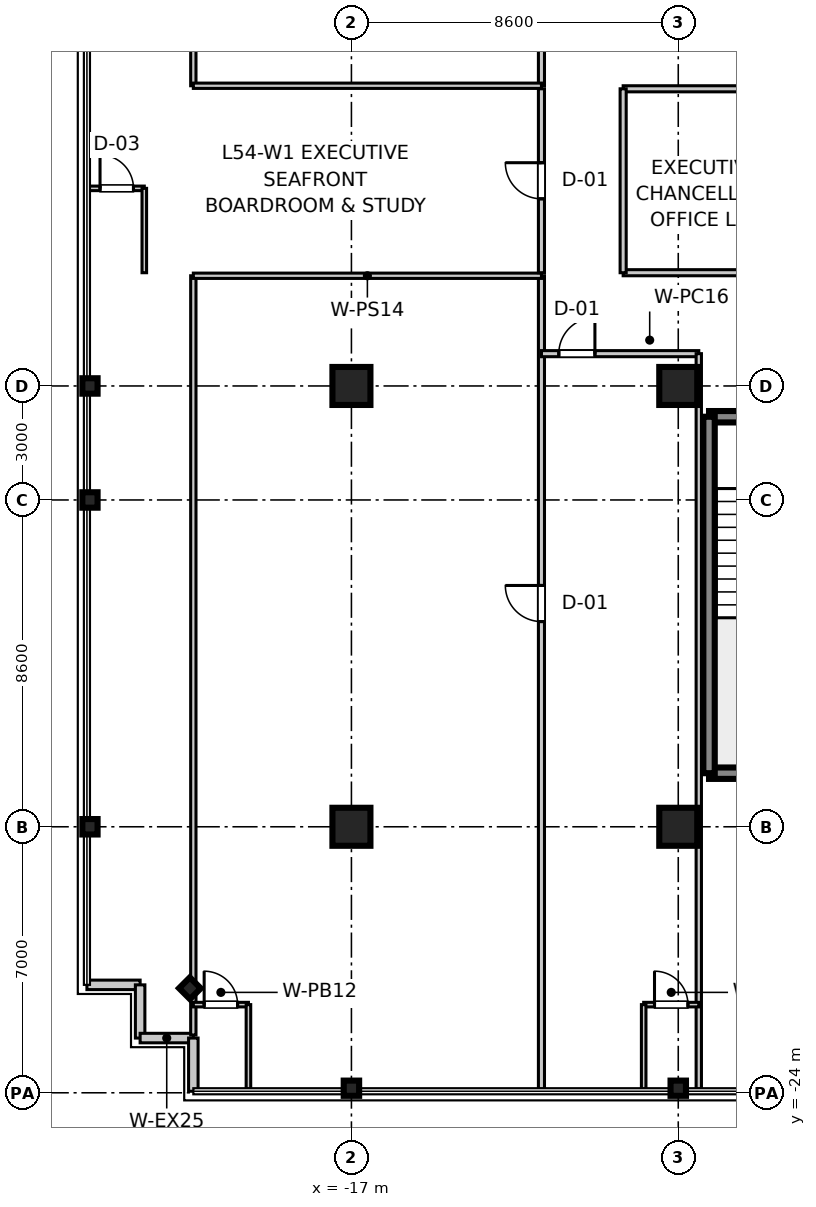
"""IFC4 building model, lengths in metres.
Left out: names, types, materials, properties, quantities, classifications, styles, units other than length and angle.
Written with IfcOpenShell. Run it as: python <this file> out.ifc"""

import sys

from ifc_helpers import new_model, si_unit, direction, frame, frame_2d, origin, origin_2d, place, context, subcontext, project, spatial, rectangle, i_section, extrude, source, transform, mapped, element, fill, save


model = new_model("IFC4")
c1 = context("Model", 3, precision=1e-05, world=origin(), true_north=direction((0.0, 1.0)))
c2 = subcontext(c1, "Body", "Model", "MODEL_VIEW")
j1 = project(units=[si_unit("LENGTHUNIT", "METRE"), si_unit("PLANEANGLEUNIT", "RADIAN")], contexts=[c1])
p1 = place(None, origin())
s1 = spatial("IfcSite", under=j1, at=p1, CompositionType="ELEMENT")
p2 = place(p1, origin())
s2 = spatial("IfcBuilding", under=s1, at=p2, CompositionType="ELEMENT")
p3 = place(p2, frame((0.0, 0.0, 212.3)))
s3 = spatial("IfcBuildingStorey", under=s2, at=p3, CompositionType="ELEMENT", Elevation=212.3)
m1 = source(origin(), c2, "Body", "SweptSolid", [
    extrude(rectangle(XDim=1.0, YDim=1.0, at=origin_2d()), origin(), (0.0, 0.0, 1.0), 3.655),
])
for number, where, z_axis, x_axis in (
    (1, (-17.0, -17.0, 0.0), (0.0, 0.0, 1.0), (1.0, 0.0, 0.0)),
    (2, (-17.0, -5.4, 0.0), (0.0, 0.0, 1.0), (1.0, 0.0, 0.0)),
    (3, (-8.4, -17.0, 0.0), (0.0, 0.0, 1.0), (1.0, 0.0, 0.0)),
    (4, (-8.4, -5.4, 0.0), (0.0, 0.0, 1.0), (1.0, 0.0, 0.0)),
):
    element("IfcColumn", number, at=place(p3, frame(where, z_axis=z_axis, x_axis=x_axis)), inside=s3, PredefinedType="COLUMN", context=c2, shape_type="MappedRepresentation", body=[
        mapped(m1, transform((0.0, 0.0, 0.0), scale=1.0)),
    ])
m2 = source(origin(), c2, "Body", "SweptSolid", [
    extrude(i_section(OverallWidth=0.401, OverallDepth=0.406, WebThickness=0.016, FlangeThickness=0.025, at=origin_2d()), origin(), (0.0, 0.0, 1.0), 3.655),
])
for number, where, z_axis, x_axis in (
    (5, (-23.88, -17.0, 0.0), (0.0, 0.0, 1.0), (1.0, 0.0, 0.0)),
    (6, (-23.88, -8.4, 0.0), (0.0, 0.0, 1.0), (1.0, 0.0, 0.0)),
    (7, (-23.88, -5.4, 0.0), (0.0, 0.0, 1.0), (1.0, 0.0, 0.0)),
    (8, (-17.0, -23.88, 0.0), (0.0, 0.0, 1.0), (0.0, 1.0, 0.0)),
    (9, (-8.4, -23.88, 0.0), (0.0, 0.0, 1.0), (0.0, 1.0, 0.0)),
    (10, (-21.25, -21.25, 0.0), (0.0, 0.0, 1.0), (0.707, 0.707, 0.0)),
):
    element("IfcColumn", number, at=place(p3, frame(where, z_axis=z_axis, x_axis=x_axis)), inside=s3, PredefinedType="COLUMN", context=c2, shape_type="MappedRepresentation", body=[
        mapped(m2, transform((0.0, 0.0, 0.0), scale=1.0)),
    ])
m3 = source(origin(), c2, "Body", "SweptSolid", [
    extrude(rectangle(XDim=3.98, YDim=0.3, at=frame_2d((1.99, 0.0))), origin(), (0.0, 0.0, 1.0), 3.41),
])
p4 = place(p3, frame((-7.59, -15.59, 0.0), z_axis=(0.0, 0.0, 1.0), x_axis=(1.0, 0.0, 0.0)))
e11 = element("IfcWall", 11, at=p4, inside=s3, PredefinedType="SHEAR", context=c2, shape_type="MappedRepresentation", body=[
    mapped(m3, transform((0.0, 0.0, 0.0), scale=1.0)),
])
p5 = place(p3, frame((-7.59, -6.21, 0.0), z_axis=(0.0, 0.0, 1.0), x_axis=(1.0, 0.0, 0.0)))
e12 = element("IfcWall", 12, at=p5, inside=s3, PredefinedType="SHEAR", context=c2, shape_type="MappedRepresentation", body=[
    mapped(m3, transform((0.0, 0.0, 0.0), scale=1.0)),
])
p6 = place(p5, frame((1.44, 0.0, 0.0)))
e13 = element("IfcOpeningElement", 13, at=p6, cuts=e12, PredefinedType="OPENING", context=c2, shape_type="SweptSolid", body=[
    extrude(rectangle(XDim=1.1, YDim=2.15, at=frame_2d((0.55, 1.075))), frame((0.0, 0.16, 0.0), z_axis=(0.0, -1.0, 0.0), x_axis=(1.0, 0.0, 0.0)), (0.0, 0.0, 1.0), 0.32),
])
m4 = source(origin(), c2, "Body", "SweptSolid", [
    extrude(rectangle(XDim=9.38, YDim=0.3, at=frame_2d((4.69, 0.0))), origin(), (0.0, 0.0, 1.0), 3.41),
])
p7 = place(p3, frame((-7.59, -15.59, 0.0), z_axis=(0.0, 0.0, 1.0), x_axis=(0.0, 1.0, 0.0)))
e14 = element("IfcWall", 14, at=p7, inside=s3, PredefinedType="SHEAR", context=c2, shape_type="MappedRepresentation", body=[
    mapped(m4, transform((0.0, 0.0, 0.0), scale=1.0)),
])
m5 = source(origin(), c2, "Body", "SweptSolid", [
    extrude(rectangle(XDim=1.4, YDim=0.25, at=frame_2d((0.7, 0.0))), origin(), (0.0, 0.0, 1.0), 3.41),
])
p8 = place(p3, frame((-23.96, -21.16, 0.0), z_axis=(0.0, 0.0, 1.0), x_axis=(1.0, 0.0, 0.0)))
e15 = element("IfcWall", 15, at=p8, inside=s3, PredefinedType="STANDARD", context=c2, shape_type="MappedRepresentation", body=[
    mapped(m5, transform((0.0, 0.0, 0.0), scale=1.0)),
])
m6 = source(origin(), c2, "Body", "SweptSolid", [
    extrude(rectangle(XDim=1.4, YDim=0.25, at=frame_2d((0.7, 0.0))), origin(), (0.0, 0.0, 1.0), 3.41),
])
for number, where, z_axis, x_axis in (
    (16, (-22.56, -22.56, 0.0), (0.0, 0.0, 1.0), (0.0, 1.0, 0.0)),
    (17, (-22.56, -22.56, 0.0), (0.0, 0.0, 1.0), (1.0, 0.0, 0.0)),
):
    element("IfcWall", number, at=place(p3, frame(where, z_axis=z_axis, x_axis=x_axis)), inside=s3, PredefinedType="STANDARD", context=c2, shape_type="MappedRepresentation", body=[
        mapped(m6, transform((0.0, 0.0, 0.0), scale=1.0)),
    ])
p9 = place(p3, frame((-21.16, -23.96, 0.0), z_axis=(0.0, 0.0, 1.0), x_axis=(0.0, 1.0, 0.0)))
e18 = element("IfcWall", 18, at=p9, inside=s3, PredefinedType="STANDARD", context=c2, shape_type="MappedRepresentation", body=[
    mapped(m5, transform((0.0, 0.0, 0.0), scale=1.0)),
])
m7 = source(origin(), c2, "Body", "SweptSolid", [
    extrude(rectangle(XDim=21.4, YDim=0.16, at=frame_2d((10.7, 0.0))), origin(), (0.0, 0.0, 1.0), 2.75),
])
p10 = place(p3, frame((-12.0, 2.5, 0.0), z_axis=(0.0, 0.0, 1.0), x_axis=(0.0, 1.0, 0.0)))
e19 = element("IfcWall", 19, at=p10, inside=s3, PredefinedType="PARTITIONING", context=c2, shape_type="MappedRepresentation", body=[
    mapped(m7, transform((0.0, 0.0, 0.0), scale=1.0)),
])
p11 = place(p10, frame((8.15, 0.0, 0.0)))
e20 = element("IfcOpeningElement", 20, at=p11, cuts=e19, PredefinedType="OPENING", context=c2, shape_type="SweptSolid", body=[
    extrude(rectangle(XDim=0.95, YDim=2.1, at=frame_2d((0.475, 1.05))), frame((0.0, 0.09, 0.0), z_axis=(0.0, -1.0, 0.0), x_axis=(1.0, 0.0, 0.0)), (0.0, 0.0, 1.0), 0.18),
])
m8 = source(origin(), c2, "Body", "SweptSolid", [
    extrude(rectangle(XDim=19.98, YDim=0.14, at=frame_2d((9.99, 0.0))), origin(), (0.0, 0.0, 1.0), 2.75),
])
p12 = place(p3, frame((-21.16, 2.5, 0.0), z_axis=(0.0, 0.0, 1.0), x_axis=(0.0, 1.0, 0.0)))
e21 = element("IfcWall", 21, at=p12, inside=s3, PredefinedType="PARTITIONING", context=c2, shape_type="MappedRepresentation", body=[
    mapped(m8, transform((0.0, 0.0, 0.0), scale=1.0)),
])
m9 = source(origin(), c2, "Body", "SweptSolid", [
    extrude(rectangle(XDim=9.16, YDim=0.14, at=frame_2d((4.58, 0.0))), origin(), (0.0, 0.0, 1.0), 2.75),
])
p13 = place(p3, frame((-21.16, 2.5, 0.0), z_axis=(0.0, 0.0, 1.0), x_axis=(1.0, 0.0, 0.0)))
e22 = element("IfcWall", 22, at=p13, inside=s3, PredefinedType="PARTITIONING", context=c2, shape_type="MappedRepresentation", body=[
    mapped(m9, transform((0.0, 0.0, 0.0), scale=1.0)),
])
p14 = place(p3, frame((-12.0, -23.9, 0.0), z_axis=(0.0, 0.0, 1.0), x_axis=(0.0, 1.0, 0.0)))
e23 = element("IfcWall", 23, at=p14, inside=s3, PredefinedType="PARTITIONING", context=c2, shape_type="MappedRepresentation", body=[
    mapped(m7, transform((0.0, 0.0, 0.0), scale=1.0)),
])
p15 = place(p14, frame((12.3, 0.0, 0.0)))
e24 = element("IfcOpeningElement", 24, at=p15, cuts=e23, PredefinedType="OPENING", context=c2, shape_type="SweptSolid", body=[
    extrude(rectangle(XDim=0.95, YDim=2.1, at=frame_2d((0.475, 1.05))), frame((0.0, 0.09, 0.0), z_axis=(0.0, -1.0, 0.0), x_axis=(1.0, 0.0, 0.0)), (0.0, 0.0, 1.0), 0.18),
])
p16 = place(p3, frame((-21.16, -22.48, 0.0), z_axis=(0.0, 0.0, 1.0), x_axis=(0.0, 1.0, 0.0)))
e25 = element("IfcWall", 25, at=p16, inside=s3, PredefinedType="PARTITIONING", context=c2, shape_type="MappedRepresentation", body=[
    mapped(m8, transform((0.0, 0.0, 0.0), scale=1.0)),
])
p17 = place(p3, frame((-21.16, -2.5, 0.0), z_axis=(0.0, 0.0, 1.0), x_axis=(1.0, 0.0, 0.0)))
e26 = element("IfcWall", 26, at=p17, inside=s3, PredefinedType="PARTITIONING", context=c2, shape_type="MappedRepresentation", body=[
    mapped(m9, transform((0.0, 0.0, 0.0), scale=1.0)),
])
m10 = source(origin(), c2, "Body", "SweptSolid", [
    extrude(rectangle(XDim=1.45, YDim=0.12, at=frame_2d((0.725, 0.0))), origin(), (0.0, 0.0, 1.0), 2.75),
])
p18 = place(p3, frame((-21.16, -21.68, 0.0), z_axis=(0.0, 0.0, 1.0), x_axis=(1.0, 0.0, 0.0)))
e27 = element("IfcWall", 27, at=p18, inside=s3, PredefinedType="PARTITIONING", context=c2, shape_type="MappedRepresentation", body=[
    mapped(m10, transform((0.0, 0.0, 0.0), scale=1.0)),
])
p19 = place(p18, frame((0.285, 0.0, 0.0)))
e28 = element("IfcOpeningElement", 28, at=p19, cuts=e27, PredefinedType="OPENING", context=c2, shape_type="SweptSolid", body=[
    extrude(rectangle(XDim=0.88, YDim=2.1, at=frame_2d((0.44, 1.05))), frame((0.0, 0.07, 0.0), z_axis=(0.0, -1.0, 0.0), x_axis=(1.0, 0.0, 0.0)), (0.0, 0.0, 1.0), 0.14),
])
m11 = source(origin(), c2, "Body", "SweptSolid", [
    extrude(rectangle(XDim=2.22, YDim=0.12, at=frame_2d((1.11, 0.0))), origin(), (0.0, 0.0, 1.0), 2.75),
])
p20 = place(p3, frame((-19.71, -23.9, 0.0), z_axis=(0.0, 0.0, 1.0), x_axis=(0.0, 1.0, 0.0)))
e29 = element("IfcWall", 29, at=p20, inside=s3, PredefinedType="PARTITIONING", context=c2, shape_type="MappedRepresentation", body=[
    mapped(m11, transform((0.0, 0.0, 0.0), scale=1.0)),
])
m12 = source(origin(), c2, "Body", "SweptSolid", [
    extrude(rectangle(XDim=4.14, YDim=0.16, at=frame_2d((2.07, 0.0))), origin(), (0.0, 0.0, 1.0), 2.75),
])
p21 = place(p3, frame((-12.0, -4.55, 0.0), z_axis=(0.0, 0.0, 1.0), x_axis=(1.0, 0.0, 0.0)))
e30 = element("IfcWall", 30, at=p21, inside=s3, PredefinedType="PARTITIONING", context=c2, shape_type="MappedRepresentation", body=[
    mapped(m12, transform((0.0, 0.0, 0.0), scale=1.0)),
])
p22 = place(p21, frame((0.457, 0.0, 0.0)))
e31 = element("IfcOpeningElement", 31, at=p22, cuts=e30, PredefinedType="OPENING", context=c2, shape_type="SweptSolid", body=[
    extrude(rectangle(XDim=0.95, YDim=2.1, at=frame_2d((0.475, 1.05))), frame((0.0, 0.09, 0.0), z_axis=(0.0, -1.0, 0.0), x_axis=(1.0, 0.0, 0.0)), (0.0, 0.0, 1.0), 0.18),
])
m13 = source(origin(), c2, "Body", "SweptSolid", [
    extrude(rectangle(XDim=19.35, YDim=0.14, at=frame_2d((9.675, 0.0))), origin(), (0.0, 0.0, 1.0), 2.75),
])
p23 = place(p3, frame((-7.86, -23.9, 0.0), z_axis=(0.0, 0.0, 1.0), x_axis=(0.0, 1.0, 0.0)))
e32 = element("IfcWall", 32, at=p23, inside=s3, PredefinedType="PARTITIONING", context=c2, shape_type="MappedRepresentation", body=[
    mapped(m13, transform((0.0, 0.0, 0.0), scale=1.0)),
])
p24 = place(p3, frame((-9.31, -21.68, 0.0), z_axis=(0.0, 0.0, 1.0), x_axis=(1.0, 0.0, 0.0)))
e33 = element("IfcWall", 33, at=p24, inside=s3, PredefinedType="PARTITIONING", context=c2, shape_type="MappedRepresentation", body=[
    mapped(m10, transform((0.0, 0.0, 0.0), scale=1.0)),
])
p25 = place(p24, frame((0.285, 0.0, 0.0)))
e34 = element("IfcOpeningElement", 34, at=p25, cuts=e33, PredefinedType="OPENING", context=c2, shape_type="SweptSolid", body=[
    extrude(rectangle(XDim=0.88, YDim=2.1, at=frame_2d((0.44, 1.05))), frame((0.0, 0.07, 0.0), z_axis=(0.0, -1.0, 0.0), x_axis=(1.0, 0.0, 0.0)), (0.0, 0.0, 1.0), 0.14),
])
p26 = place(p3, frame((-9.31, -23.9, 0.0), z_axis=(0.0, 0.0, 1.0), x_axis=(0.0, 1.0, 0.0)))
e35 = element("IfcWall", 35, at=p26, inside=s3, PredefinedType="PARTITIONING", context=c2, shape_type="MappedRepresentation", body=[
    mapped(m11, transform((0.0, 0.0, 0.0), scale=1.0)),
])
m14 = source(origin(), c2, "Body", "SweptSolid", [
    extrude(rectangle(XDim=4.84, YDim=0.16, at=frame_2d((2.42, 0.0))), origin(), (0.0, 0.0, 1.0), 2.75),
])
p27 = place(p3, frame((-12.0, -2.42, 0.0), z_axis=(0.0, 0.0, 1.0), x_axis=(0.0, 1.0, 0.0)))
e36 = element("IfcWall", 36, at=p27, inside=s3, PredefinedType="PARTITIONING", context=c2, shape_type="MappedRepresentation", body=[
    mapped(m14, transform((0.0, 0.0, 0.0), scale=1.0)),
])
p28 = place(p27, frame((1.945, 0.0, 0.0)))
e37 = element("IfcOpeningElement", 37, at=p28, cuts=e36, PredefinedType="OPENING", context=c2, shape_type="SweptSolid", body=[
    extrude(rectangle(XDim=0.95, YDim=2.1, at=frame_2d((0.475, 1.05))), frame((0.0, 0.09, 0.0), z_axis=(0.0, -1.0, 0.0), x_axis=(1.0, 0.0, 0.0)), (0.0, 0.0, 1.0), 0.18),
])
p29 = place(p3, frame((-23.9, -0.2, 0.0), z_axis=(0.0, 0.0, 1.0), x_axis=(1.0, 0.0, 0.0)))
e38 = element("IfcWall", 38, at=p29, inside=s3, PredefinedType="PARTITIONING", context=c2, shape_type="MappedRepresentation", body=[
    mapped(m10, transform((0.0, 0.0, 0.0), scale=1.0)),
])
p30 = place(p29, frame((0.285, 0.0, 0.0)))
e39 = element("IfcOpeningElement", 39, at=p30, cuts=e38, PredefinedType="OPENING", context=c2, shape_type="SweptSolid", body=[
    extrude(rectangle(XDim=0.88, YDim=2.1, at=frame_2d((0.44, 1.05))), frame((0.0, 0.07, 0.0), z_axis=(0.0, -1.0, 0.0), x_axis=(1.0, 0.0, 0.0)), (0.0, 0.0, 1.0), 0.14),
])
p31 = place(p3, frame((-22.45, -2.42, 0.0), z_axis=(0.0, 0.0, 1.0), x_axis=(0.0, 1.0, 0.0)))
e40 = element("IfcWall", 40, at=p31, inside=s3, PredefinedType="PARTITIONING", context=c2, shape_type="MappedRepresentation", body=[
    mapped(m11, transform((0.0, 0.0, 0.0), scale=1.0)),
])
m15 = source(origin(), c2, "Body", "SweptSolid", [
    extrude(rectangle(XDim=4.472, YDim=0.16, at=frame_2d((2.236, 0.0))), origin(), (0.0, 0.0, 1.0), 2.75),
])
p32 = place(p3, frame((-9.85, -2.42, 0.0), z_axis=(0.0, 0.0, 1.0), x_axis=(1.0, 0.0, 0.0)))
e41 = element("IfcWall", 41, at=p32, inside=s3, PredefinedType="PARTITIONING", context=c2, shape_type="MappedRepresentation", body=[
    mapped(m15, transform((0.0, 0.0, 0.0), scale=1.0)),
])
p33 = place(p3, frame((-9.85, 2.42, 0.0), z_axis=(0.0, 0.0, 1.0), x_axis=(1.0, 0.0, 0.0)))
e42 = element("IfcWall", 42, at=p33, inside=s3, PredefinedType="PARTITIONING", context=c2, shape_type="MappedRepresentation", body=[
    mapped(m15, transform((0.0, 0.0, 0.0), scale=1.0)),
])
p34 = place(p33, frame((3.093, 0.0, 0.0)))
e43 = element("IfcOpeningElement", 43, at=p34, cuts=e42, PredefinedType="OPENING", context=c2, shape_type="SweptSolid", body=[
    extrude(rectangle(XDim=0.88, YDim=2.1, at=frame_2d((0.44, 1.05))), frame((0.0, 0.09, 0.0), z_axis=(0.0, -1.0, 0.0), x_axis=(1.0, 0.0, 0.0)), (0.0, 0.0, 1.0), 0.18),
])
p35 = place(p3, frame((-9.85, -2.42, 0.0), z_axis=(0.0, 0.0, 1.0), x_axis=(0.0, 1.0, 0.0)))
e44 = element("IfcWall", 44, at=p35, inside=s3, PredefinedType="PARTITIONING", context=c2, shape_type="MappedRepresentation", body=[
    mapped(m14, transform((0.0, 0.0, 0.0), scale=1.0)),
])
m16 = source(origin(), c2, "Body", "SweptSolid", [
    extrude(rectangle(XDim=0.88, YDim=2.1, at=frame_2d((0.44, 1.05))), frame((0.0, 0.025, 0.0), z_axis=(0.0, -1.0, 0.0), x_axis=(1.0, 0.0, 0.0)), (0.0, 0.0, 1.0), 0.05),
])
p36 = place(p19, frame((0.88, 0.0, 0.0), z_axis=(0.0, 0.0, 1.0), x_axis=(-1.0, 0.0, 0.0)))
e45 = element("IfcDoor", 45, at=p36, inside=s3, OperationType="SINGLE_SWING_LEFT", PredefinedType="DOOR", context=c2, shape_type="MappedRepresentation", body=[
    mapped(m16, transform((0.0, 0.0, 0.0), scale=1.0)),
])
fill(e28, e45)
m17 = source(origin(), c2, "Body", "SweptSolid", [
    extrude(rectangle(XDim=0.95, YDim=2.1, at=frame_2d((0.475, 1.05))), frame((0.0, 0.025, 0.0), z_axis=(0.0, -1.0, 0.0), x_axis=(1.0, 0.0, 0.0)), (0.0, 0.0, 1.0), 0.05),
])
p37 = place(p15, origin())
e46 = element("IfcDoor", 46, at=p37, inside=s3, OperationType="SINGLE_SWING_RIGHT", PredefinedType="DOOR", context=c2, shape_type="MappedRepresentation", body=[
    mapped(m17, transform((0.0, 0.0, 0.0), scale=1.0)),
])
fill(e24, e46)
p38 = place(p25, frame((0.88, 0.0, 0.0), z_axis=(0.0, 0.0, 1.0), x_axis=(-1.0, 0.0, 0.0)))
e47 = element("IfcDoor", 47, at=p38, inside=s3, OperationType="SINGLE_SWING_LEFT", PredefinedType="DOOR", context=c2, shape_type="MappedRepresentation", body=[
    mapped(m16, transform((0.0, 0.0, 0.0), scale=1.0)),
])
fill(e34, e47)
p39 = place(p22, frame((0.95, 0.0, 0.0), z_axis=(0.0, 0.0, 1.0), x_axis=(-1.0, 0.0, 0.0)))
e48 = element("IfcDoor", 48, at=p39, inside=s3, OperationType="SINGLE_SWING_RIGHT", PredefinedType="DOOR", context=c2, shape_type="MappedRepresentation", body=[
    mapped(m17, transform((0.0, 0.0, 0.0), scale=1.0)),
])
fill(e31, e48)
p40 = place(p30, frame((0.88, 0.0, 0.0), z_axis=(0.0, 0.0, 1.0), x_axis=(-1.0, 0.0, 0.0)))
e49 = element("IfcDoor", 49, at=p40, inside=s3, OperationType="SINGLE_SWING_LEFT", PredefinedType="DOOR", context=c2, shape_type="MappedRepresentation", body=[
    mapped(m16, transform((0.0, 0.0, 0.0), scale=1.0)),
])
fill(e39, e49)
p41 = place(p28, origin())
e50 = element("IfcDoor", 50, at=p41, inside=s3, OperationType="SINGLE_SWING_RIGHT", PredefinedType="DOOR", context=c2, shape_type="MappedRepresentation", body=[
    mapped(m17, transform((0.0, 0.0, 0.0), scale=1.0)),
])
fill(e37, e50)
save(model, sys.argv[1])
